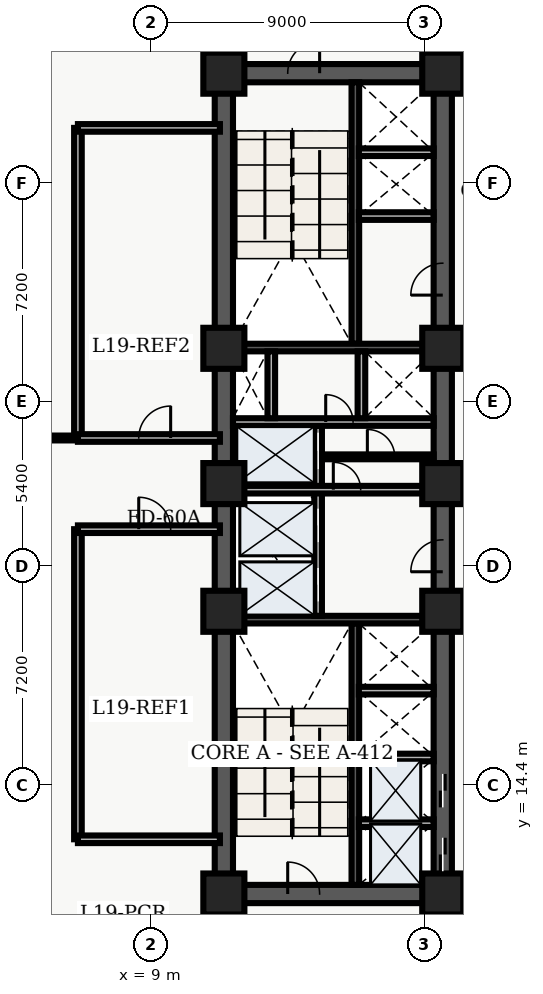
"""IFC4 building model, lengths in metres.
Left out: names, types, materials, properties, quantities, classifications, styles, units other than length and angle.
Written with IfcOpenShell. Run it as: python <this file> out.ifc"""

import sys

from ifc_helpers import new_model, entity, si_unit, converted_unit, direction, frame, origin_with_axes, origin_2d_with_axis, place, context, subcontext, project, spatial, polyline, rectangle, outline, extrude, element, fill, save


model = new_model("IFC4")
c1 = context("Model", 3, precision=1e-05, world=origin_with_axes(), true_north=direction((0.0, 1.0)))
c2 = subcontext(c1, "Body", "Model", "MODEL_VIEW")
j1 = project(units=[si_unit("LENGTHUNIT", "METRE"), converted_unit("PLANEANGLEUNIT", "DEGREE", entity("IfcPlaneAngleMeasure", 0.017), si_unit("PLANEANGLEUNIT", "RADIAN"), dimensions=[0, 0, 0, 0, 0, 0, 0])], contexts=[c1])
p1 = place(None, origin_with_axes())
s1 = spatial("IfcSite", under=j1, at=p1, CompositionType="ELEMENT")
p2 = place(p1, origin_with_axes())
s2 = spatial("IfcBuilding", under=s1, at=p2, CompositionType="ELEMENT")
p3 = place(p2, frame((0.0, 0.0, 79.5), z_axis=(0.0, 0.0, 1.0), x_axis=(1.0, 0.0, 0.0)))
s3 = spatial("IfcBuildingStorey", under=s2, at=p3, CompositionType="ELEMENT", Elevation=79.5)
p4 = place(p3, frame((11.4, 10.8, 0.0), z_axis=(0.0, 0.0, 1.0), x_axis=(0.0, 1.0, 0.0)))
e1 = element("IfcWall", 1, at=p4, inside=s3, PredefinedType="SHEAR", context=c2, shape_type="SweptSolid", body=[
    extrude(outline(polyline([(0.0, -0.3), (27.0, -0.3), (27.0, 0.3), (0.0, 0.3), (0.0, -0.3)])), origin_with_axes(), (0.0, 0.0, 1.0), 4.86),
])
p5 = place(p3, frame((11.4, 10.8, 0.0), z_axis=(0.0, 0.0, 1.0), x_axis=(1.0, 0.0, 0.0)))
e2 = element("IfcWall", 2, at=p5, inside=s3, PredefinedType="SHEAR", context=c2, shape_type="SweptSolid", body=[
    extrude(outline(polyline([(0.0, -0.3), (7.2, -0.3), (7.2, 0.3), (0.0, 0.3), (0.0, -0.3)])), origin_with_axes(), (0.0, 0.0, 1.0), 4.86),
])
p6 = place(p5, frame((2.625, 0.0, 0.0), z_axis=(0.0, 0.0, 1.0), x_axis=(1.0, 0.0, 0.0)))
e3 = element("IfcOpeningElement", 3, at=p6, cuts=e2, PredefinedType="OPENING", context=c2, shape_type="SweptSolid", body=[
    extrude(rectangle(XDim=1.05, YDim=0.62, at=origin_2d_with_axis()), origin_with_axes(), (0.0, 0.0, 1.0), 2.15),
])
p7 = place(p3, frame((11.4, 37.8, 0.0), z_axis=(0.0, 0.0, 1.0), x_axis=(1.0, 0.0, 0.0)))
e4 = element("IfcWall", 4, at=p7, inside=s3, PredefinedType="SHEAR", context=c2, shape_type="SweptSolid", body=[
    extrude(outline(polyline([(0.0, -0.3), (7.2, -0.3), (7.2, 0.3), (0.0, 0.3), (0.0, -0.3)])), origin_with_axes(), (0.0, 0.0, 1.0), 4.86),
])
p8 = place(p7, frame((2.625, 0.0, 0.0), z_axis=(0.0, 0.0, 1.0), x_axis=(1.0, 0.0, 0.0)))
e5 = element("IfcOpeningElement", 5, at=p8, cuts=e4, PredefinedType="OPENING", context=c2, shape_type="SweptSolid", body=[
    extrude(rectangle(XDim=1.05, YDim=0.62, at=origin_2d_with_axis()), origin_with_axes(), (0.0, 0.0, 1.0), 2.15),
])
p9 = place(p3, frame((18.6, 10.8, 0.0), z_axis=(0.0, 0.0, 1.0), x_axis=(0.0, 1.0, 0.0)))
e6 = element("IfcWall", 6, at=p9, inside=s3, PredefinedType="SHEAR", context=c2, shape_type="SweptSolid", body=[
    extrude(outline(polyline([(0.0, -0.3), (13.5, -0.3), (13.5, 0.3), (0.0, 0.3), (0.0, -0.3)])), origin_with_axes(), (0.0, 0.0, 1.0), 4.86),
])
p10 = place(p9, frame((1.3, 0.0, 0.0), z_axis=(0.0, 0.0, 1.0), x_axis=(1.0, 0.0, 0.0)))
e7 = element("IfcOpeningElement", 7, at=p10, cuts=e6, PredefinedType="OPENING", context=c2, shape_type="SweptSolid", body=[
    extrude(rectangle(XDim=1.1, YDim=0.62, at=origin_2d_with_axis()), origin_with_axes(), (0.0, 0.0, 1.0), 2.15),
])
p11 = place(p9, frame((3.4, 0.0, 0.0), z_axis=(0.0, 0.0, 1.0), x_axis=(1.0, 0.0, 0.0)))
e8 = element("IfcOpeningElement", 8, at=p11, cuts=e6, PredefinedType="OPENING", context=c2, shape_type="SweptSolid", body=[
    extrude(rectangle(XDim=1.1, YDim=0.62, at=origin_2d_with_axis()), origin_with_axes(), (0.0, 0.0, 1.0), 2.15),
])
p12 = place(p9, frame((11.125, 0.0, 0.0), z_axis=(0.0, 0.0, 1.0), x_axis=(1.0, 0.0, 0.0)))
e9 = element("IfcOpeningElement", 9, at=p12, cuts=e6, PredefinedType="OPENING", context=c2, shape_type="SweptSolid", body=[
    extrude(rectangle(XDim=1.05, YDim=0.62, at=origin_2d_with_axis()), origin_with_axes(), (0.0, 0.0, 1.0), 2.15),
])
p13 = place(p3, frame((18.6, 24.3, 0.0), z_axis=(0.0, 0.0, 1.0), x_axis=(0.0, 1.0, 0.0)))
e10 = element("IfcWall", 10, at=p13, inside=s3, PredefinedType="SHEAR", context=c2, shape_type="SweptSolid", body=[
    extrude(outline(polyline([(0.0, -0.3), (13.5, -0.3), (13.5, 0.3), (0.0, 0.3), (0.0, -0.3)])), origin_with_axes(), (0.0, 0.0, 1.0), 4.86),
])
p14 = place(p13, frame((6.725, 0.0, 0.0), z_axis=(0.0, 0.0, 1.0), x_axis=(1.0, 0.0, 0.0)))
e11 = element("IfcOpeningElement", 11, at=p14, cuts=e10, PredefinedType="OPENING", context=c2, shape_type="SweptSolid", body=[
    extrude(rectangle(XDim=1.05, YDim=0.62, at=origin_2d_with_axis()), origin_with_axes(), (0.0, 0.0, 1.0), 2.15),
])
p15 = place(p3, frame((15.725, 11.1, 0.0), z_axis=(0.0, 0.0, 1.0), x_axis=(0.0, 1.0, 0.0)))
e12 = element("IfcWall", 12, at=p15, inside=s3, PredefinedType="SHEAR", context=c2, shape_type="SweptSolid", body=[
    extrude(outline(polyline([(0.0, -0.125), (8.6, -0.125), (8.6, 0.125), (0.0, 0.125), (0.0, -0.125)])), origin_with_axes(), (0.0, 0.0, 1.0), 4.86),
])
p16 = place(p3, frame((11.7, 19.825, 0.0), z_axis=(0.0, 0.0, 1.0), x_axis=(1.0, 0.0, 0.0)))
e13 = element("IfcWall", 13, at=p16, inside=s3, PredefinedType="SHEAR", context=c2, shape_type="SweptSolid", body=[
    extrude(outline(polyline([(0.0, -0.125), (6.6, -0.125), (6.6, 0.125), (0.0, 0.125), (0.0, -0.125)])), origin_with_axes(), (0.0, 0.0, 1.0), 4.86),
])
p17 = place(p3, frame((15.725, 28.9, 0.0), z_axis=(0.0, 0.0, 1.0), x_axis=(0.0, 1.0, 0.0)))
e14 = element("IfcWall", 14, at=p17, inside=s3, PredefinedType="SHEAR", context=c2, shape_type="SweptSolid", body=[
    extrude(outline(polyline([(0.0, -0.125), (8.6, -0.125), (8.6, 0.125), (0.0, 0.125), (0.0, -0.125)])), origin_with_axes(), (0.0, 0.0, 1.0), 4.86),
])
p18 = place(p3, frame((11.7, 28.775, 0.0), z_axis=(0.0, 0.0, 1.0), x_axis=(1.0, 0.0, 0.0)))
e15 = element("IfcWall", 15, at=p18, inside=s3, PredefinedType="SHEAR", context=c2, shape_type="SweptSolid", body=[
    extrude(outline(polyline([(0.0, -0.125), (6.6, -0.125), (6.6, 0.125), (0.0, 0.125), (0.0, -0.125)])), origin_with_axes(), (0.0, 0.0, 1.0), 4.86),
])
p19 = place(p3, frame((14.5, 19.95, 0.0), z_axis=(0.0, 0.0, 1.0), x_axis=(0.0, 1.0, 0.0)))
e16 = element("IfcWall", 16, at=p19, inside=s3, PredefinedType="SOLIDWALL", context=c2, shape_type="SweptSolid", body=[
    extrude(outline(polyline([(0.0, -0.125), (6.25, -0.125), (6.25, 0.125), (0.0, 0.125), (0.0, -0.125)])), origin_with_axes(), (0.0, 0.0, 1.0), 3.6),
])
p20 = place(p19, frame((1.025, 0.0, 0.0), z_axis=(0.0, 0.0, 1.0), x_axis=(1.0, 0.0, 0.0)))
e17 = element("IfcOpeningElement", 17, at=p20, cuts=e16, PredefinedType="OPENING", context=c2, shape_type="SweptSolid", body=[
    extrude(rectangle(XDim=1.1, YDim=0.27, at=origin_2d_with_axis()), origin_with_axes(), (0.0, 0.0, 1.0), 2.15),
])
p21 = place(p19, frame((2.975, 0.0, 0.0), z_axis=(0.0, 0.0, 1.0), x_axis=(1.0, 0.0, 0.0)))
e18 = element("IfcOpeningElement", 18, at=p21, cuts=e16, PredefinedType="OPENING", context=c2, shape_type="SweptSolid", body=[
    extrude(rectangle(XDim=1.1, YDim=0.27, at=origin_2d_with_axis()), origin_with_axes(), (0.0, 0.0, 1.0), 2.15),
])
p22 = place(p19, frame((5.425, 0.0, 0.0), z_axis=(0.0, 0.0, 1.0), x_axis=(1.0, 0.0, 0.0)))
e19 = element("IfcOpeningElement", 19, at=p22, cuts=e16, PredefinedType="OPENING", context=c2, shape_type="SweptSolid", body=[
    extrude(rectangle(XDim=1.2, YDim=0.27, at=origin_2d_with_axis()), origin_with_axes(), (0.0, 0.0, 1.0), 2.15),
])
p23 = place(p3, frame((11.7, 24.1, 0.0), z_axis=(0.0, 0.0, 1.0), x_axis=(1.0, 0.0, 0.0)))
e20 = element("IfcWall", 20, at=p23, inside=s3, PredefinedType="SOLIDWALL", context=c2, shape_type="SweptSolid", body=[
    extrude(outline(polyline([(0.0, -0.125), (6.6, -0.125), (6.6, 0.125), (0.0, 0.125), (0.0, -0.125)])), origin_with_axes(), (0.0, 0.0, 1.0), 3.6),
])
p24 = place(p23, frame((3.75, 0.0, 0.0), z_axis=(0.0, 0.0, 1.0), x_axis=(1.0, 0.0, 0.0)))
e21 = element("IfcOpeningElement", 21, at=p24, cuts=e20, PredefinedType="OPENING", context=c2, shape_type="SweptSolid", body=[
    extrude(rectangle(XDim=0.9, YDim=0.27, at=origin_2d_with_axis()), origin_with_axes(), (0.0, 0.0, 1.0), 2.15),
])
p25 = place(p3, frame((11.7, 26.325, 0.0), z_axis=(0.0, 0.0, 1.0), x_axis=(1.0, 0.0, 0.0)))
e22 = element("IfcWall", 22, at=p25, inside=s3, PredefinedType="SOLIDWALL", context=c2, shape_type="SweptSolid", body=[
    extrude(outline(polyline([(0.0, -0.125), (6.6, -0.125), (6.6, 0.125), (0.0, 0.125), (0.0, -0.125)])), origin_with_axes(), (0.0, 0.0, 1.0), 3.6),
])
p26 = place(p25, frame((3.5, 0.0, 0.0), z_axis=(0.0, 0.0, 1.0), x_axis=(1.0, 0.0, 0.0)))
e23 = element("IfcOpeningElement", 23, at=p26, cuts=e22, PredefinedType="OPENING", context=c2, shape_type="SweptSolid", body=[
    extrude(rectangle(XDim=0.9, YDim=0.27, at=origin_2d_with_axis()), origin_with_axes(), (0.0, 0.0, 1.0), 2.15),
])
for number, where, z_axis, x_axis in (
    (24, (12.96, 26.45, 0.0), (0.0, 0.0, 1.0), (0.0, 1.0, 0.0)),
    (25, (15.925, 26.45, 0.0), (0.0, 0.0, 1.0), (0.0, 1.0, 0.0)),
):
    element("IfcWall", number, at=place(p3, frame(where, z_axis=z_axis, x_axis=x_axis)), inside=s3, PredefinedType="SOLIDWALL", context=c2, shape_type="SweptSolid", body=[
        extrude(outline(polyline([(0.0, -0.125), (2.2, -0.125), (2.2, 0.125), (0.0, 0.125), (0.0, -0.125)])), origin_with_axes(), (0.0, 0.0, 1.0), 3.6),
    ])
for number, where, z_axis, x_axis in (
    (26, (11.4, 10.8, 0.0), (0.0, 0.0, 1.0), (1.0, 0.0, 0.0)),
    (27, (11.4, 20.1, 0.0), (0.0, 0.0, 1.0), (1.0, 0.0, 0.0)),
    (28, (11.4, 24.3, 0.0), (0.0, 0.0, 1.0), (1.0, 0.0, 0.0)),
    (29, (11.4, 28.75, 0.0), (0.0, 0.0, 1.0), (1.0, 0.0, 0.0)),
    (30, (11.4, 37.8, 0.0), (0.0, 0.0, 1.0), (1.0, 0.0, 0.0)),
    (31, (18.6, 10.8, 0.0), (0.0, 0.0, 1.0), (1.0, 0.0, 0.0)),
    (32, (18.6, 20.1, 0.0), (0.0, 0.0, 1.0), (1.0, 0.0, 0.0)),
    (33, (18.6, 24.3, 0.0), (0.0, 0.0, 1.0), (1.0, 0.0, 0.0)),
    (34, (18.6, 28.75, 0.0), (0.0, 0.0, 1.0), (1.0, 0.0, 0.0)),
    (35, (18.6, 37.8, 0.0), (0.0, 0.0, 1.0), (1.0, 0.0, 0.0)),
):
    element("IfcColumn", number, at=place(p3, frame(where, z_axis=z_axis, x_axis=x_axis)), inside=s3, PredefinedType="COLUMN", context=c2, shape_type="SweptSolid", body=[
        extrude(rectangle(XDim=1.35, YDim=1.35, at=origin_2d_with_axis()), origin_with_axes(), (0.0, 0.0, 1.0), 5.1),
    ])
p27 = place(p3, frame((14.62, 25.18, 0.0), z_axis=(0.0, 0.0, 1.0), x_axis=(1.0, 0.0, 0.0)))
e36 = element("IfcWall", 36, at=p27, inside=s3, PredefinedType="PARTITIONING", context=c2, shape_type="SweptSolid", body=[
    extrude(outline(polyline([(0.0, -0.08), (3.68, -0.08), (3.68, 0.08), (0.0, 0.08), (0.0, -0.08)])), origin_with_axes(), (0.0, 0.0, 1.0), 3.2),
])
p28 = place(p27, frame((1.95, 0.0, 0.0), z_axis=(0.0, 0.0, 1.0), x_axis=(1.0, 0.0, 0.0)))
e37 = element("IfcOpeningElement", 37, at=p28, cuts=e36, PredefinedType="OPENING", context=c2, shape_type="SweptSolid", body=[
    extrude(rectangle(XDim=0.9, YDim=0.18, at=origin_2d_with_axis()), origin_with_axes(), (0.0, 0.0, 1.0), 2.15),
])
for number, where, z_axis, x_axis in (
    (38, (15.84, 13.13, 0.0), (0.0, 0.0, 1.0), (1.0, 0.0, 0.0)),
    (39, (15.84, 15.29, 0.0), (0.0, 0.0, 1.0), (1.0, 0.0, 0.0)),
    (40, (15.84, 17.49, 0.0), (0.0, 0.0, 1.0), (1.0, 0.0, 0.0)),
    (41, (15.84, 33.1, 0.0), (0.0, 0.0, 1.0), (1.0, 0.0, 0.0)),
    (42, (15.84, 35.2, 0.0), (0.0, 0.0, 1.0), (1.0, 0.0, 0.0)),
):
    element("IfcWall", number, at=place(p3, frame(where, z_axis=z_axis, x_axis=x_axis)), inside=s3, PredefinedType="SOLIDWALL", context=c2, shape_type="SweptSolid", body=[
        extrude(outline(polyline([(0.0, -0.125), (2.46, -0.125), (2.46, 0.125), (0.0, 0.125), (0.0, -0.125)])), origin_with_axes(), (0.0, 0.0, 1.0), 3.2),
    ])
p29 = place(p3, frame((6.6, 12.6, 0.0), z_axis=(0.0, 0.0, 1.0), x_axis=(0.0, 1.0, 0.0)))
e43 = element("IfcWall", 43, at=p29, inside=s3, PredefinedType="SOLIDWALL", context=c2, shape_type="SweptSolid", body=[
    extrude(outline(polyline([(0.0, -0.125), (10.2, -0.125), (10.2, 0.125), (0.0, 0.125), (0.0, -0.125)])), origin_with_axes(), (0.0, 0.0, 1.0), 3.2),
])
p30 = place(p3, frame((6.6, 12.6, 0.0), z_axis=(0.0, 0.0, 1.0), x_axis=(1.0, 0.0, 0.0)))
e44 = element("IfcWall", 44, at=p30, inside=s3, PredefinedType="SOLIDWALL", context=c2, shape_type="SweptSolid", body=[
    extrude(outline(polyline([(0.0, -0.125), (4.67, -0.125), (4.67, 0.125), (0.0, 0.125), (0.0, -0.125)])), origin_with_axes(), (0.0, 0.0, 1.0), 3.2),
])
p31 = place(p3, frame((6.6, 22.8, 0.0), z_axis=(0.0, 0.0, 1.0), x_axis=(1.0, 0.0, 0.0)))
e45 = element("IfcWall", 45, at=p31, inside=s3, PredefinedType="SOLIDWALL", context=c2, shape_type="SweptSolid", body=[
    extrude(outline(polyline([(0.0, -0.125), (4.67, -0.125), (4.67, 0.125), (0.0, 0.125), (0.0, -0.125)])), origin_with_axes(), (0.0, 0.0, 1.0), 3.2),
])
p32 = place(p31, frame((2.525, 0.0, 0.0), z_axis=(0.0, 0.0, 1.0), x_axis=(1.0, 0.0, 0.0)))
e46 = element("IfcOpeningElement", 46, at=p32, cuts=e45, PredefinedType="OPENING", context=c2, shape_type="SweptSolid", body=[
    extrude(rectangle(XDim=1.05, YDim=0.27, at=origin_2d_with_axis()), origin_with_axes(), (0.0, 0.0, 1.0), 2.15),
])
p33 = place(p3, frame((4.8, 25.8, 0.0), z_axis=(0.0, 0.0, 1.0), x_axis=(1.0, 0.0, 0.0)))
e47 = element("IfcWall", 47, at=p33, inside=s3, PredefinedType="PARTITIONING", context=c2, shape_type="SweptSolid", body=[
    extrude(outline(polyline([(0.0, -0.08), (1.8, -0.08), (1.8, 0.08), (0.0, 0.08), (0.0, -0.08)])), origin_with_axes(), (0.0, 0.0, 1.0), 3.2),
])
p34 = place(p3, frame((6.6, 25.8, 0.0), z_axis=(0.0, 0.0, 1.0), x_axis=(0.0, 1.0, 0.0)))
e48 = element("IfcWall", 48, at=p34, inside=s3, PredefinedType="SOLIDWALL", context=c2, shape_type="SweptSolid", body=[
    extrude(outline(polyline([(0.0, -0.125), (10.2, -0.125), (10.2, 0.125), (0.0, 0.125), (0.0, -0.125)])), origin_with_axes(), (0.0, 0.0, 1.0), 3.2),
])
p35 = place(p3, frame((6.6, 25.8, 0.0), z_axis=(0.0, 0.0, 1.0), x_axis=(1.0, 0.0, 0.0)))
e49 = element("IfcWall", 49, at=p35, inside=s3, PredefinedType="SOLIDWALL", context=c2, shape_type="SweptSolid", body=[
    extrude(outline(polyline([(0.0, -0.125), (4.67, -0.125), (4.67, 0.125), (0.0, 0.125), (0.0, -0.125)])), origin_with_axes(), (0.0, 0.0, 1.0), 3.2),
])
p36 = place(p35, frame((2.525, 0.0, 0.0), z_axis=(0.0, 0.0, 1.0), x_axis=(1.0, 0.0, 0.0)))
e50 = element("IfcOpeningElement", 50, at=p36, cuts=e49, PredefinedType="OPENING", context=c2, shape_type="SweptSolid", body=[
    extrude(rectangle(XDim=1.05, YDim=0.27, at=origin_2d_with_axis()), origin_with_axes(), (0.0, 0.0, 1.0), 2.15),
])
p37 = place(p3, frame((6.6, 36.0, 0.0), z_axis=(0.0, 0.0, 1.0), x_axis=(1.0, 0.0, 0.0)))
e51 = element("IfcWall", 51, at=p37, inside=s3, PredefinedType="SOLIDWALL", context=c2, shape_type="SweptSolid", body=[
    extrude(outline(polyline([(0.0, -0.125), (4.67, -0.125), (4.67, 0.125), (0.0, 0.125), (0.0, -0.125)])), origin_with_axes(), (0.0, 0.0, 1.0), 3.2),
])
p38 = place(p9, frame((1.3, 0.0, 0.0), z_axis=(0.0, 0.0, 1.0), x_axis=(1.0, 0.0, 0.0)))
e52 = element("IfcDoor", 52, at=p38, inside=s3, OperationType="SLIDING_TO_LEFT", PredefinedType="DOOR", context=c2, shape_type="SweptSolid", body=[
    extrude(rectangle(XDim=1.1, YDim=0.09, at=origin_2d_with_axis()), origin_with_axes(), (0.0, 0.0, 1.0), 2.15),
])
fill(e7, e52)
p39 = place(p9, frame((3.4, 0.0, 0.0), z_axis=(0.0, 0.0, 1.0), x_axis=(1.0, 0.0, 0.0)))
e53 = element("IfcDoor", 53, at=p39, inside=s3, OperationType="SLIDING_TO_RIGHT", PredefinedType="DOOR", context=c2, shape_type="SweptSolid", body=[
    extrude(rectangle(XDim=1.1, YDim=0.09, at=origin_2d_with_axis()), origin_with_axes(), (0.0, 0.0, 1.0), 2.15),
])
fill(e8, e53)
p40 = place(p19, frame((1.025, 0.0, 0.0), z_axis=(0.0, 0.0, 1.0), x_axis=(1.0, 0.0, 0.0)))
e54 = element("IfcDoor", 54, at=p40, inside=s3, OperationType="SLIDING_TO_LEFT", PredefinedType="DOOR", context=c2, shape_type="SweptSolid", body=[
    extrude(rectangle(XDim=1.1, YDim=0.09, at=origin_2d_with_axis()), origin_with_axes(), (0.0, 0.0, 1.0), 2.15),
])
fill(e17, e54)
p41 = place(p19, frame((2.975, 0.0, 0.0), z_axis=(0.0, 0.0, 1.0), x_axis=(1.0, 0.0, 0.0)))
e55 = element("IfcDoor", 55, at=p41, inside=s3, OperationType="SLIDING_TO_RIGHT", PredefinedType="DOOR", context=c2, shape_type="SweptSolid", body=[
    extrude(rectangle(XDim=1.1, YDim=0.09, at=origin_2d_with_axis()), origin_with_axes(), (0.0, 0.0, 1.0), 2.15),
])
fill(e18, e55)
p42 = place(p19, frame((5.425, 0.0, 0.0), z_axis=(0.0, 0.0, 1.0), x_axis=(1.0, 0.0, 0.0)))
e56 = element("IfcDoor", 56, at=p42, inside=s3, OperationType="DOUBLE_DOOR_SLIDING", PredefinedType="DOOR", context=c2, shape_type="SweptSolid", body=[
    extrude(rectangle(XDim=1.2, YDim=0.09, at=origin_2d_with_axis()), origin_with_axes(), (0.0, 0.0, 1.0), 2.15),
])
fill(e19, e56)
p43 = place(p5, frame((2.625, 0.0, 0.0), z_axis=(0.0, 0.0, 1.0), x_axis=(1.0, 0.0, 0.0)))
e57 = element("IfcDoor", 57, at=p43, inside=s3, OperationType="SINGLE_SWING_LEFT", PredefinedType="DOOR", context=c2, shape_type="SweptSolid", body=[
    extrude(rectangle(XDim=1.05, YDim=0.09, at=origin_2d_with_axis()), origin_with_axes(), (0.0, 0.0, 1.0), 2.15),
])
fill(e3, e57)
p44 = place(p7, frame((2.625, 0.0, 0.0), z_axis=(0.0, 0.0, 1.0), x_axis=(1.0, 0.0, 0.0)))
e58 = element("IfcDoor", 58, at=p44, inside=s3, OperationType="SINGLE_SWING_RIGHT", PredefinedType="DOOR", context=c2, shape_type="SweptSolid", body=[
    extrude(rectangle(XDim=1.05, YDim=0.09, at=origin_2d_with_axis()), origin_with_axes(), (0.0, 0.0, 1.0), 2.15),
])
fill(e5, e58)
p45 = place(p9, frame((11.125, 0.0, 0.0), z_axis=(0.0, 0.0, 1.0), x_axis=(1.0, 0.0, 0.0)))
e59 = element("IfcDoor", 59, at=p45, inside=s3, OperationType="SINGLE_SWING_LEFT", PredefinedType="DOOR", context=c2, shape_type="SweptSolid", body=[
    extrude(rectangle(XDim=1.05, YDim=0.09, at=origin_2d_with_axis()), origin_with_axes(), (0.0, 0.0, 1.0), 2.15),
])
fill(e9, e59)
p46 = place(p25, frame((3.5, 0.0, 0.0), z_axis=(0.0, 0.0, 1.0), x_axis=(1.0, 0.0, 0.0)))
e60 = element("IfcDoor", 60, at=p46, inside=s3, OperationType="SINGLE_SWING_LEFT", PredefinedType="DOOR", context=c2, shape_type="SweptSolid", body=[
    extrude(rectangle(XDim=0.9, YDim=0.09, at=origin_2d_with_axis()), origin_with_axes(), (0.0, 0.0, 1.0), 2.15),
])
fill(e23, e60)
p47 = place(p23, frame((3.75, 0.0, 0.0), z_axis=(0.0, 0.0, 1.0), x_axis=(1.0, 0.0, 0.0)))
e61 = element("IfcDoor", 61, at=p47, inside=s3, OperationType="SINGLE_SWING_LEFT", PredefinedType="DOOR", context=c2, shape_type="SweptSolid", body=[
    extrude(rectangle(XDim=0.9, YDim=0.09, at=origin_2d_with_axis()), origin_with_axes(), (0.0, 0.0, 1.0), 2.15),
])
fill(e21, e61)
p48 = place(p27, frame((1.95, 0.0, 0.0), z_axis=(0.0, 0.0, 1.0), x_axis=(1.0, 0.0, 0.0)))
e62 = element("IfcDoor", 62, at=p48, inside=s3, OperationType="SINGLE_SWING_LEFT", PredefinedType="DOOR", context=c2, shape_type="SweptSolid", body=[
    extrude(rectangle(XDim=0.9, YDim=0.09, at=origin_2d_with_axis()), origin_with_axes(), (0.0, 0.0, 1.0), 2.15),
])
fill(e37, e62)
p49 = place(p13, frame((6.725, 0.0, 0.0), z_axis=(0.0, 0.0, 1.0), x_axis=(1.0, 0.0, 0.0)))
e63 = element("IfcDoor", 63, at=p49, inside=s3, OperationType="SINGLE_SWING_LEFT", PredefinedType="DOOR", context=c2, shape_type="SweptSolid", body=[
    extrude(rectangle(XDim=1.05, YDim=0.09, at=origin_2d_with_axis()), origin_with_axes(), (0.0, 0.0, 1.0), 2.15),
])
fill(e11, e63)
p50 = place(p31, frame((2.525, 0.0, 0.0), z_axis=(0.0, 0.0, 1.0), x_axis=(1.0, 0.0, 0.0)))
e64 = element("IfcDoor", 64, at=p50, inside=s3, OperationType="SINGLE_SWING_LEFT", PredefinedType="DOOR", context=c2, shape_type="SweptSolid", body=[
    extrude(rectangle(XDim=1.05, YDim=0.09, at=origin_2d_with_axis()), origin_with_axes(), (0.0, 0.0, 1.0), 2.15),
])
fill(e46, e64)
p51 = place(p35, frame((2.525, 0.0, 0.0), z_axis=(0.0, 0.0, 1.0), x_axis=(1.0, 0.0, 0.0)))
e65 = element("IfcDoor", 65, at=p51, inside=s3, OperationType="SINGLE_SWING_RIGHT", PredefinedType="DOOR", context=c2, shape_type="SweptSolid", body=[
    extrude(rectangle(XDim=1.05, YDim=0.09, at=origin_2d_with_axis()), origin_with_axes(), (0.0, 0.0, 1.0), 2.15),
])
fill(e50, e65)
save(model, sys.argv[1])
